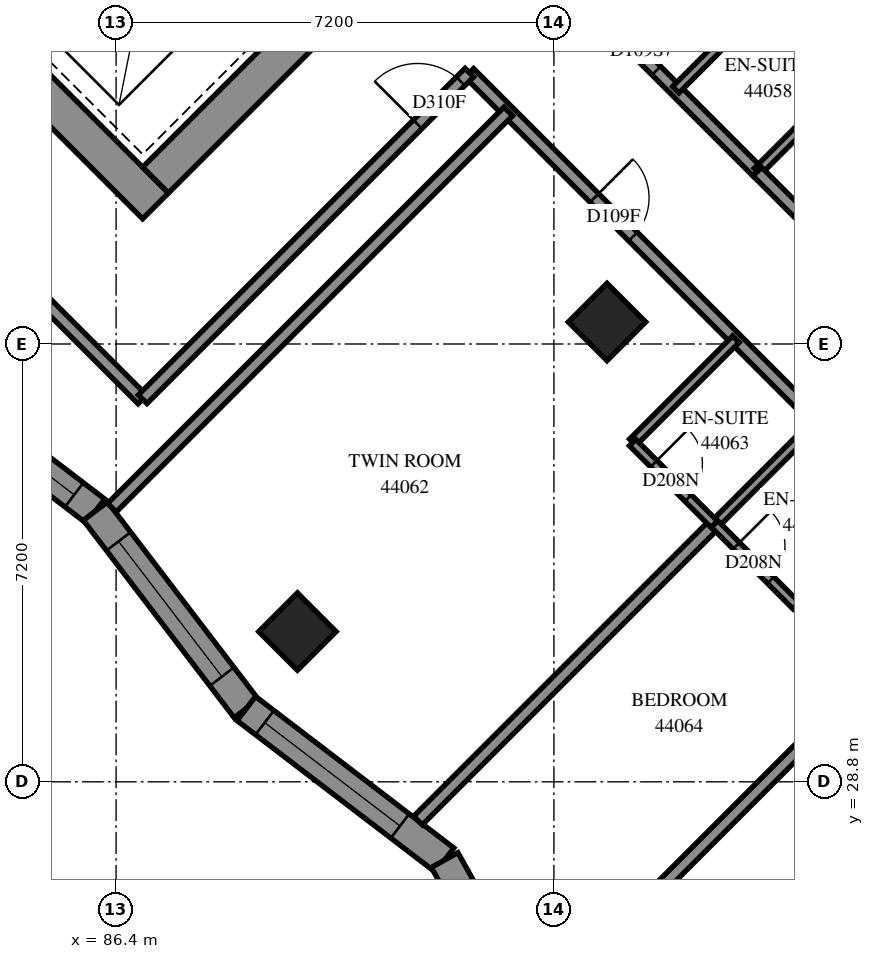
"""IFC4 building model, lengths in metres.
Left out: names, types, materials, properties, quantities, classifications, styles, units other than length and angle.
Written with IfcOpenShell. Run it as: python <this file> out.ifc"""

import sys

from ifc_helpers import new_model, si_unit, direction, frame, frame_2d, origin, origin_2d, place, context, subcontext, project, spatial, polyline, rectangle, outline, extrude, element, fill, save


model = new_model("IFC4")
c1 = context("Model", 3, precision=1e-05, world=origin(), true_north=direction((0.0, 1.0)))
c2 = subcontext(c1, "Body", "Model", "MODEL_VIEW")
j1 = project(units=[si_unit("LENGTHUNIT", "METRE"), si_unit("PLANEANGLEUNIT", "RADIAN")], contexts=[c1])
p1 = place(None, origin())
s1 = spatial("IfcSite", under=j1, at=p1, CompositionType="ELEMENT")
p2 = place(p1, origin())
s2 = spatial("IfcBuilding", under=s1, at=p2, CompositionType="ELEMENT")
p3 = place(p2, frame((0.0, 0.0, 162.6)))
s3 = spatial("IfcBuildingStorey", under=s2, at=p3, CompositionType="ELEMENT", Elevation=162.6)
for number, where, z_axis, x_axis in (
    (1, (94.474, 36.362, 0.0), (0.0, 0.0, 1.0), (0.707, -0.707, 0.0)),
    (2, (89.382, 31.271, 0.0), (0.0, 0.0, 1.0), (0.707, -0.707, 0.0)),
):
    element("IfcColumn", number, at=place(p3, frame(where, z_axis=z_axis, x_axis=x_axis)), inside=s3, PredefinedType="COLUMN", context=c2, shape_type="SweptSolid", body=[
        extrude(rectangle(XDim=0.9, YDim=0.9, at=origin_2d()), origin(), (0.0, 0.0, 1.0), 3.1),
    ])
p4 = place(p3, frame((76.018, 49.302, -0.3), z_axis=(0.0, 0.0, 1.0), x_axis=(0.7071067812, -0.7071067812, 0.0)))
e3 = element("IfcWall", 3, at=p4, inside=s3, PredefinedType="SHEAR", context=c2, shape_type="SweptSolid", body=[
    extrude(rectangle(XDim=15.6, YDim=0.6, at=frame_2d((7.8, 0.0))), origin(), (0.0, 0.0, 1.0), 2.7),
])
p5 = place(p3, frame((87.049, 38.695, -0.3), z_axis=(0.0, 0.0, 1.0), x_axis=(0.7071067812, 0.7071067812, 0.0)))
e4 = element("IfcWall", 4, at=p5, inside=s3, PredefinedType="SHEAR", context=c2, shape_type="SweptSolid", body=[
    extrude(rectangle(XDim=14.4, YDim=0.6, at=frame_2d((7.2, 0.0))), origin(), (0.0, 0.0, 1.0), 2.7),
])
p6 = place(p5, frame((4.55, 0.0, 0.3)))
e5 = element("IfcOpeningElement", 5, at=p6, cuts=e4, PredefinedType="OPENING", context=c2, shape_type="SweptSolid", body=[
    extrude(rectangle(XDim=1.1, YDim=2.1, at=frame_2d((0.55, 1.05))), frame((0.0, 0.31, 0.0), z_axis=(0.0, -1.0, 0.0), x_axis=(1.0, 0.0, 0.0)), (0.0, 0.0, 1.0), 0.62),
])
p7 = place(p5, frame((11.35, 0.0, 0.3)))
e6 = element("IfcOpeningElement", 6, at=p7, cuts=e4, PredefinedType="OPENING", context=c2, shape_type="SweptSolid", body=[
    extrude(rectangle(XDim=1.1, YDim=2.1, at=frame_2d((0.55, 1.05))), frame((0.0, 0.31, 0.0), z_axis=(0.0, -1.0, 0.0), x_axis=(1.0, 0.0, 0.0)), (0.0, 0.0, 1.0), 0.62),
])
p8 = place(p3, frame((82.813, 35.733, 0.0), z_axis=(0.0, 0.0, 1.0), x_axis=(0.7946501833, -0.6070676125, 0.0)))
e7 = element("IfcWall", 7, at=p8, inside=s3, PredefinedType="SOLIDWALL", context=c2, shape_type="SweptSolid", body=[
    extrude(outline(polyline([(-0.034, -0.25), (4.053, -0.25), (4.12, 0.25), (0.034, 0.25), (-0.034, -0.25)])), origin(), (0.0, 0.0, 1.0), 3.1),
])
p9 = place(p8, frame((0.846, 0.0, 0.45)))
e8 = element("IfcOpeningElement", 8, at=p9, cuts=e7, PredefinedType="OPENING", context=c2, shape_type="SweptSolid", body=[
    extrude(rectangle(XDim=2.8, YDim=2.5, at=frame_2d((1.4, 1.25))), frame((0.0, 0.26, 0.0), z_axis=(0.0, -1.0, 0.0), x_axis=(1.0, 0.0, 0.0)), (0.0, 0.0, 1.0), 0.52),
])
p10 = place(p3, frame((86.06, 33.252, 0.0), z_axis=(0.0, 0.0, 1.0), x_axis=(0.6070676125, -0.7946501833, 0.0)))
e9 = element("IfcWall", 9, at=p10, inside=s3, PredefinedType="SOLIDWALL", context=c2, shape_type="SweptSolid", body=[
    extrude(outline(polyline([(0.034, -0.25), (4.12, -0.25), (4.053, 0.25), (-0.034, 0.25), (0.034, -0.25)])), origin(), (0.0, 0.0, 1.0), 3.1),
])
p11 = place(p10, frame((0.626, 0.0, 0.45)))
e10 = element("IfcOpeningElement", 10, at=p11, cuts=e9, PredefinedType="OPENING", context=c2, shape_type="SweptSolid", body=[
    extrude(rectangle(XDim=2.8, YDim=2.5, at=frame_2d((1.4, 1.25))), frame((0.0, 0.26, 0.0), z_axis=(0.0, -1.0, 0.0), x_axis=(1.0, 0.0, 0.0)), (0.0, 0.0, 1.0), 0.52),
])
p12 = place(p3, frame((88.541, 30.005, 0.0), z_axis=(0.0, 0.0, 1.0), x_axis=(0.7946475008, -0.6070711239, 0.0)))
e11 = element("IfcWall", 11, at=p12, inside=s3, PredefinedType="SOLIDWALL", context=c2, shape_type="SweptSolid", body=[
    extrude(outline(polyline([(-0.034, -0.25), (4.053, -0.25), (4.156, 0.25), (0.034, 0.25), (-0.034, -0.25)])), origin(), (0.0, 0.0, 1.0), 3.1),
])
p13 = place(p12, frame((0.382, 0.0, 0.45)))
e12 = element("IfcOpeningElement", 12, at=p13, cuts=e11, PredefinedType="OPENING", context=c2, shape_type="SweptSolid", body=[
    extrude(rectangle(XDim=2.8, YDim=2.5, at=frame_2d((1.4, 1.25))), frame((0.0, 0.26, 0.0), z_axis=(0.0, -1.0, 0.0), x_axis=(1.0, 0.0, 0.0)), (0.0, 0.0, 1.0), 0.52),
])
p14 = place(p3, frame((91.802, 27.514, 0.0), z_axis=(0.0, 0.0, 1.0), x_axis=(0.4886665533, -0.8724706297, 0.0)))
e13 = element("IfcWall", 13, at=p14, inside=s3, PredefinedType="SOLIDWALL", context=c2, shape_type="SweptSolid", body=[
    extrude(outline(polyline([(0.052, -0.25), (4.26, -0.25), (3.837, 0.25), (-0.052, 0.25), (0.052, -0.25)])), origin(), (0.0, 0.0, 1.0), 3.1),
])
p15 = place(p14, frame((0.971, 0.0, 0.45)))
e14 = element("IfcOpeningElement", 14, at=p15, cuts=e13, PredefinedType="OPENING", context=c2, shape_type="SweptSolid", body=[
    extrude(rectangle(XDim=1.2, YDim=2.5, at=frame_2d((0.6, 1.25))), frame((0.0, 0.26, 0.0), z_axis=(0.0, -1.0, 0.0), x_axis=(1.0, 0.0, 0.0)), (0.0, 0.0, 1.0), 0.52),
])
p16 = place(p3, frame((92.209, 40.459, 0.0), z_axis=(0.0, 0.0, 1.0), x_axis=(0.7071067812, -0.7071067812, 0.0)))
e15 = element("IfcWall", 15, at=p16, inside=s3, PredefinedType="PARTITIONING", context=c2, shape_type="SweptSolid", body=[
    extrude(rectangle(XDim=11.698, YDim=0.2, at=frame_2d((5.849, 0.0))), origin(), (0.0, 0.0, 1.0), 3.1),
])
p17 = place(p16, frame((2.908, 0.0, 0.0)))
e16 = element("IfcOpeningElement", 16, at=p17, cuts=e15, PredefinedType="OPENING", context=c2, shape_type="SweptSolid", body=[
    extrude(rectangle(XDim=0.9, YDim=2.1, at=frame_2d((0.45, 1.05))), frame((0.0, 0.11, 0.0), z_axis=(0.0, -1.0, 0.0), x_axis=(1.0, 0.0, 0.0)), (0.0, 0.0, 1.0), 0.22),
])
p18 = place(p16, frame((10.181, 0.0, 0.0)))
e17 = element("IfcOpeningElement", 17, at=p18, cuts=e15, PredefinedType="OPENING", context=c2, shape_type="SweptSolid", body=[
    extrude(rectangle(XDim=0.9, YDim=2.1, at=frame_2d((0.45, 1.05))), frame((0.0, 0.11, 0.0), z_axis=(0.0, -1.0, 0.0), x_axis=(1.0, 0.0, 0.0)), (0.0, 0.0, 1.0), 0.22),
])
p19 = place(p3, frame((86.332, 33.309, 0.0), z_axis=(0.0, 0.0, 1.0), x_axis=(0.7072098544, 0.7070036929, 0.0)))
e18 = element("IfcWall", 18, at=p19, inside=s3, PredefinedType="PARTITIONING", context=c2, shape_type="SweptSolid", body=[
    extrude(rectangle(XDim=9.216, YDim=0.2, at=frame_2d((4.608, 0.0))), origin(), (0.0, 0.0, 1.0), 3.1),
])
p20 = place(p3, frame((80.423, 41.497, 0.0), z_axis=(0.0, 0.0, 1.0), x_axis=(0.7071067812, -0.7071067812, 0.0)))
e19 = element("IfcWall", 19, at=p20, inside=s3, PredefinedType="PARTITIONING", context=c2, shape_type="SweptSolid", body=[
    extrude(rectangle(XDim=9.065, YDim=0.2, at=frame_2d((4.532, 0.0))), origin(), (0.0, 0.0, 1.0), 3.1),
])
p21 = place(p3, frame((86.837, 35.091, 0.0), z_axis=(0.0, 0.0, 1.0), x_axis=(0.7071067812, 0.7071067812, 0.0)))
e20 = element("IfcWall", 20, at=p21, inside=s3, PredefinedType="PARTITIONING", context=c2, shape_type="SweptSolid", body=[
    extrude(rectangle(XDim=7.597, YDim=0.2, at=frame_2d((3.799, 0.0))), origin(), (0.0, 0.0, 1.0), 3.1),
])
p22 = place(p21, frame((6.395, 0.0, 0.0)))
e21 = element("IfcOpeningElement", 21, at=p22, cuts=e20, PredefinedType="OPENING", context=c2, shape_type="SweptSolid", body=[
    extrude(rectangle(XDim=1.0, YDim=2.1, at=frame_2d((0.5, 1.05))), frame((0.0, 0.11, 0.0), z_axis=(0.0, -1.0, 0.0), x_axis=(1.0, 0.0, 0.0)), (0.0, 0.0, 1.0), 0.22),
])
p23 = place(p3, frame((91.364, 28.163, 0.0), z_axis=(0.0, 0.0, 1.0), x_axis=(0.7071067812, 0.7071067812, 0.0)))
e22 = element("IfcWall", 22, at=p23, inside=s3, PredefinedType="PARTITIONING", context=c2, shape_type="SweptSolid", body=[
    extrude(rectangle(XDim=6.896, YDim=0.2, at=frame_2d((3.448, 0.0))), origin(), (0.0, 0.0, 1.0), 3.1),
])
p24 = place(p3, frame((94.923, 26.631, 0.0), z_axis=(0.0, 0.0, 1.0), x_axis=(0.7071067812, 0.7071067812, 0.0)))
e23 = element("IfcWall", 23, at=p24, inside=s3, PredefinedType="PARTITIONING", context=c2, shape_type="SweptSolid", body=[
    extrude(rectangle(XDim=5.926, YDim=0.2, at=frame_2d((2.963, 0.0))), origin(), (0.0, 0.0, 1.0), 2.6),
])
p25 = place(p3, frame((97.305, 41.881, 0.0), z_axis=(0.0, 0.0, 1.0), x_axis=(0.7067382634, -0.707475107, 0.0)))
e24 = element("IfcWall", 24, at=p25, inside=s3, PredefinedType="PARTITIONING", context=c2, shape_type="SweptSolid", body=[
    extrude(rectangle(XDim=3.8, YDim=0.15, at=frame_2d((1.9, 0.0))), origin(), (0.0, 0.0, 1.0), 3.1),
])
p26 = place(p25, frame((0.445, 0.0, 0.0)))
e25 = element("IfcOpeningElement", 25, at=p26, cuts=e24, PredefinedType="OPENING", context=c2, shape_type="SweptSolid", body=[
    extrude(rectangle(XDim=0.8, YDim=2.1, at=frame_2d((0.4, 1.05))), frame((0.0, 0.085, 0.0), z_axis=(0.0, -1.0, 0.0), x_axis=(1.0, 0.0, 0.0)), (0.0, 0.0, 1.0), 0.17),
])
p27 = place(p25, frame((2.556, 0.0, 0.0)))
e26 = element("IfcOpeningElement", 26, at=p27, cuts=e24, PredefinedType="OPENING", context=c2, shape_type="SweptSolid", body=[
    extrude(rectangle(XDim=0.8, YDim=2.1, at=frame_2d((0.4, 1.05))), frame((0.0, 0.085, 0.0), z_axis=(0.0, -1.0, 0.0), x_axis=(1.0, 0.0, 0.0)), (0.0, 0.0, 1.0), 0.17),
])
p28 = place(p3, frame((94.399, 41.379, 0.0), z_axis=(0.0, 0.0, 1.0), x_axis=(0.7071067812, -0.7071067812, 0.0)))
e27 = element("IfcWall", 27, at=p28, inside=s3, PredefinedType="PARTITIONING", context=c2, shape_type="SweptSolid", body=[
    extrude(rectangle(XDim=3.601, YDim=0.2, at=frame_2d((1.8, 0.0))), origin(), (0.0, 0.0, 1.0), 3.1),
])
p29 = place(p28, frame((0.35, 0.0, 0.0)))
e28 = element("IfcOpeningElement", 28, at=p29, cuts=e27, PredefinedType="OPENING", context=c2, shape_type="SweptSolid", body=[
    extrude(rectangle(XDim=0.9, YDim=2.1, at=frame_2d((0.45, 1.05))), frame((0.0, 0.11, 0.0), z_axis=(0.0, -1.0, 0.0), x_axis=(1.0, 0.0, 0.0)), (0.0, 0.0, 1.0), 0.22),
])
for number, where, z_axis, x_axis in (
    (29, (95.603, 40.181, 0.0), (0.0, 0.0, 1.0), (0.707, 0.707, 0.0)),
    (30, (96.947, 38.837, 0.0), (0.0, 0.0, 1.0), (0.707, 0.707, 0.0)),
    (31, (97.583, 31.695, 0.0), (0.0, 0.0, 1.0), (0.707, 0.707, 0.0)),
):
    element("IfcWall", number, at=place(p3, frame(where, z_axis=z_axis, x_axis=x_axis)), inside=s3, PredefinedType="PARTITIONING", context=c2, shape_type="SweptSolid", body=[
        extrude(rectangle(XDim=2.401, YDim=0.15, at=frame_2d((1.201, 0.0))), origin(), (0.0, 0.0, 1.0), 3.1),
    ])
p30 = place(p3, frame((96.245, 33.035, 0.0), z_axis=(0.0, 0.0, 1.0), x_axis=(0.706689978, 0.7075233388, 0.0)))
e32 = element("IfcWall", 32, at=p30, inside=s3, PredefinedType="PARTITIONING", context=c2, shape_type="SweptSolid", body=[
    extrude(rectangle(XDim=2.4, YDim=0.15, at=frame_2d((1.2, 0.0))), origin(), (0.0, 0.0, 1.0), 3.1),
])
p31 = place(p3, frame((94.897, 34.383, 0.0), z_axis=(0.0, 0.0, 1.0), x_axis=(0.7071067812, 0.7071067812, 0.0)))
e33 = element("IfcWall", 33, at=p31, inside=s3, PredefinedType="PARTITIONING", context=c2, shape_type="SweptSolid", body=[
    extrude(rectangle(XDim=2.398, YDim=0.15, at=frame_2d((1.199, 0.0))), origin(), (0.0, 0.0, 1.0), 3.1),
])
p32 = place(p3, frame((94.895, 34.379, 0.0), z_axis=(0.0, 0.0, 1.0), x_axis=(0.7071067812, -0.7071067812, 0.0)))
e34 = element("IfcWall", 34, at=p32, inside=s3, PredefinedType="PARTITIONING", context=c2, shape_type="SweptSolid", body=[
    extrude(rectangle(XDim=1.901, YDim=0.15, at=frame_2d((0.95, 0.0))), origin(), (0.0, 0.0, 1.0), 3.1),
])
p33 = place(p32, frame((0.491, 0.0, 0.0)))
e35 = element("IfcOpeningElement", 35, at=p33, cuts=e34, PredefinedType="OPENING", context=c2, shape_type="SweptSolid", body=[
    extrude(rectangle(XDim=0.8, YDim=2.1, at=frame_2d((0.4, 1.05))), frame((0.0, 0.085, 0.0), z_axis=(0.0, -1.0, 0.0), x_axis=(1.0, 0.0, 0.0)), (0.0, 0.0, 1.0), 0.17),
])
p34 = place(p3, frame((96.946, 38.834, 0.0), z_axis=(0.0, 0.0, 1.0), x_axis=(0.7076330979, -0.7065800724, 0.0)))
e36 = element("IfcWall", 36, at=p34, inside=s3, PredefinedType="PARTITIONING", context=c2, shape_type="SweptSolid", body=[
    extrude(rectangle(XDim=1.899, YDim=0.2, at=frame_2d((0.95, 0.0))), origin(), (0.0, 0.0, 1.0), 3.1),
])
p35 = place(p3, frame((96.243, 33.039, 0.0), z_axis=(0.0, 0.0, 1.0), x_axis=(0.7065800724, -0.7076330979, 0.0)))
e37 = element("IfcWall", 37, at=p35, inside=s3, PredefinedType="PARTITIONING", context=c2, shape_type="SweptSolid", body=[
    extrude(rectangle(XDim=1.899, YDim=0.15, at=frame_2d((0.95, 0.0))), origin(), (0.0, 0.0, 1.0), 3.1),
])
p36 = place(p35, frame((0.504, 0.0, 0.0)))
e38 = element("IfcOpeningElement", 38, at=p36, cuts=e37, PredefinedType="OPENING", context=c2, shape_type="SweptSolid", body=[
    extrude(rectangle(XDim=0.8, YDim=2.1, at=frame_2d((0.4, 1.05))), frame((0.0, 0.085, 0.0), z_axis=(0.0, -1.0, 0.0), x_axis=(1.0, 0.0, 0.0)), (0.0, 0.0, 1.0), 0.17),
])
p37 = place(p9, origin())
e39 = element("IfcWindow", 39, at=p37, inside=s3, PartitioningType="SINGLE_PANEL", PredefinedType="WINDOW", context=c2, shape_type="SweptSolid", body=[
    extrude(rectangle(XDim=2.8, YDim=2.5, at=frame_2d((1.4, 1.25))), frame((0.0, 0.18, 0.0), z_axis=(0.0, -1.0, 0.0), x_axis=(1.0, 0.0, 0.0)), (0.0, 0.0, 1.0), 0.06),
])
fill(e8, e39)
p38 = place(p11, origin())
e40 = element("IfcWindow", 40, at=p38, inside=s3, PartitioningType="SINGLE_PANEL", PredefinedType="WINDOW", context=c2, shape_type="SweptSolid", body=[
    extrude(rectangle(XDim=2.8, YDim=2.5, at=frame_2d((1.4, 1.25))), frame((0.0, 0.18, 0.0), z_axis=(0.0, -1.0, 0.0), x_axis=(1.0, 0.0, 0.0)), (0.0, 0.0, 1.0), 0.06),
])
fill(e10, e40)
p39 = place(p13, origin())
e41 = element("IfcWindow", 41, at=p39, inside=s3, PartitioningType="SINGLE_PANEL", PredefinedType="WINDOW", context=c2, shape_type="SweptSolid", body=[
    extrude(rectangle(XDim=2.8, YDim=2.5, at=frame_2d((1.4, 1.25))), frame((0.0, 0.18, 0.0), z_axis=(0.0, -1.0, 0.0), x_axis=(1.0, 0.0, 0.0)), (0.0, 0.0, 1.0), 0.06),
])
fill(e12, e41)
p40 = place(p29, origin())
e42 = element("IfcDoor", 42, at=p40, inside=s3, OperationType="SINGLE_SWING_RIGHT", PredefinedType="DOOR", context=c2, shape_type="SweptSolid", body=[
    extrude(rectangle(XDim=0.9, YDim=2.1, at=frame_2d((0.45, 1.05))), frame((0.0, 0.025, 0.0), z_axis=(0.0, -1.0, 0.0), x_axis=(1.0, 0.0, 0.0)), (0.0, 0.0, 1.0), 0.05),
])
fill(e28, e42)
p41 = place(p22, origin())
e43 = element("IfcDoor", 43, at=p41, inside=s3, OperationType="SINGLE_SWING_LEFT", PredefinedType="DOOR", context=c2, shape_type="SweptSolid", body=[
    extrude(rectangle(XDim=1.0, YDim=2.1, at=frame_2d((0.5, 1.05))), frame((0.0, 0.025, 0.0), z_axis=(0.0, -1.0, 0.0), x_axis=(1.0, 0.0, 0.0)), (0.0, 0.0, 1.0), 0.05),
])
fill(e21, e43)
p42 = place(p17, origin())
e44 = element("IfcDoor", 44, at=p42, inside=s3, OperationType="SINGLE_SWING_LEFT", PredefinedType="DOOR", context=c2, shape_type="SweptSolid", body=[
    extrude(rectangle(XDim=0.9, YDim=2.1, at=frame_2d((0.45, 1.05))), frame((0.0, 0.025, 0.0), z_axis=(0.0, -1.0, 0.0), x_axis=(1.0, 0.0, 0.0)), (0.0, 0.0, 1.0), 0.05),
])
fill(e16, e44)
p43 = place(p33, origin())
e45 = element("IfcDoor", 45, at=p43, inside=s3, OperationType="SINGLE_SWING_RIGHT", PredefinedType="DOOR", context=c2, shape_type="SweptSolid", body=[
    extrude(rectangle(XDim=0.8, YDim=2.1, at=frame_2d((0.4, 1.05))), frame((0.0, 0.025, 0.0), z_axis=(0.0, -1.0, 0.0), x_axis=(1.0, 0.0, 0.0)), (0.0, 0.0, 1.0), 0.05),
])
fill(e35, e45)
p44 = place(p36, origin())
e46 = element("IfcDoor", 46, at=p44, inside=s3, OperationType="SINGLE_SWING_RIGHT", PredefinedType="DOOR", context=c2, shape_type="SweptSolid", body=[
    extrude(rectangle(XDim=0.8, YDim=2.1, at=frame_2d((0.4, 1.05))), frame((0.0, 0.025, 0.0), z_axis=(0.0, -1.0, 0.0), x_axis=(1.0, 0.0, 0.0)), (0.0, 0.0, 1.0), 0.05),
])
fill(e38, e46)
save(model, sys.argv[1])
